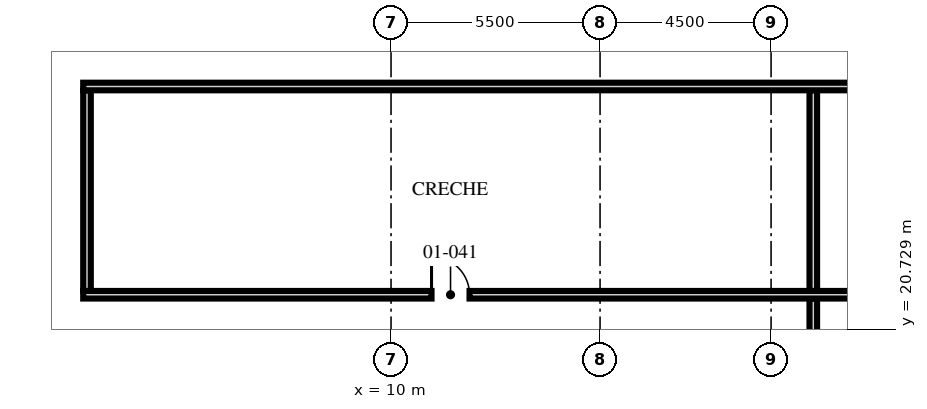
"""IFC4 building model, lengths in metres.
Left out: names, types, materials, properties, quantities, classifications, styles, units other than length and angle.
Written with IfcOpenShell. Run it as: python <this file> out.ifc"""

import sys

from ifc_helpers import new_model, si_unit, direction, frame, frame_2d, origin, place, context, subcontext, project, spatial, rectangle, extrude, element, fill, save


model = new_model("IFC4")
c1 = context("Model", 3, precision=1e-05, world=origin(), true_north=direction((0.0, 1.0)))
c2 = subcontext(c1, "Body", "Model", "MODEL_VIEW")
j1 = project(units=[si_unit("LENGTHUNIT", "METRE"), si_unit("PLANEANGLEUNIT", "RADIAN")], contexts=[c1])
p1 = place(None, origin())
s1 = spatial("IfcSite", under=j1, at=p1, CompositionType="ELEMENT")
p2 = place(p1, origin())
s2 = spatial("IfcBuilding", under=s1, at=p2, CompositionType="ELEMENT")
p3 = place(p2, frame((0.0, 0.0, 6.0)))
s3 = spatial("IfcBuildingStorey", under=s2, at=p3, CompositionType="ELEMENT", Elevation=6.0)
p4 = place(p3, frame((21.111, -20.491, 0.0), z_axis=(0.0, 0.0, 1.0), x_axis=(0.0, 1.0, 0.0)))
e1 = element("IfcWall", 1, at=p4, inside=s3, PredefinedType="SOLIDWALL", context=c2, shape_type="SweptSolid", body=[
    extrude(rectangle(XDim=42.022, YDim=0.2, at=frame_2d((21.011, 0.0))), origin(), (0.0, 0.0, 1.0), 3.5),
])
p5 = place(p4, frame((3.623, 0.0, 0.0)))
e2 = element("IfcOpeningElement", 2, at=p5, cuts=e1, PredefinedType="OPENING", context=c2, shape_type="SweptSolid", body=[
    extrude(rectangle(XDim=1.0, YDim=2.1, at=frame_2d((0.5, 1.05))), frame((0.0, 0.11, 0.0), z_axis=(0.0, -1.0, 0.0), x_axis=(1.0, 0.0, 0.0)), (0.0, 0.0, 1.0), 0.22),
])
p6 = place(p4, frame((13.14, 0.0, 0.0)))
e3 = element("IfcOpeningElement", 3, at=p6, cuts=e1, PredefinedType="OPENING", context=c2, shape_type="SweptSolid", body=[
    extrude(rectangle(XDim=1.0, YDim=2.1, at=frame_2d((0.5, 1.05))), frame((0.0, 0.11, 0.0), z_axis=(0.0, -1.0, 0.0), x_axis=(1.0, 0.0, 0.0)), (0.0, 0.0, 1.0), 0.22),
])
p7 = place(p4, frame((21.769, 0.0, 0.0)))
e4 = element("IfcOpeningElement", 4, at=p7, cuts=e1, PredefinedType="OPENING", context=c2, shape_type="SweptSolid", body=[
    extrude(rectangle(XDim=1.0, YDim=2.1, at=frame_2d((0.5, 1.05))), frame((0.0, 0.11, 0.0), z_axis=(0.0, -1.0, 0.0), x_axis=(1.0, 0.0, 0.0)), (0.0, 0.0, 1.0), 0.22),
])
p8 = place(p4, frame((31.47, 0.0, 0.0)))
e5 = element("IfcOpeningElement", 5, at=p8, cuts=e1, PredefinedType="OPENING", context=c2, shape_type="SweptSolid", body=[
    extrude(rectangle(XDim=1.0, YDim=2.1, at=frame_2d((0.5, 1.05))), frame((0.0, 0.11, 0.0), z_axis=(0.0, -1.0, 0.0), x_axis=(1.0, 0.0, 0.0)), (0.0, 0.0, 1.0), 0.22),
])
p9 = place(p4, frame((38.657, 0.0, 0.0)))
e6 = element("IfcOpeningElement", 6, at=p9, cuts=e1, PredefinedType="OPENING", context=c2, shape_type="SweptSolid", body=[
    extrude(rectangle(XDim=1.0, YDim=2.1, at=frame_2d((0.5, 1.05))), frame((0.0, 0.11, 0.0), z_axis=(0.0, -1.0, 0.0), x_axis=(1.0, 0.0, 0.0)), (0.0, 0.0, 1.0), 0.22),
])
p10 = place(p4, frame((8.918, 0.0, 0.0)))
e7 = element("IfcOpeningElement", 7, at=p10, cuts=e1, PredefinedType="OPENING", context=c2, shape_type="SweptSolid", body=[
    extrude(rectangle(XDim=1.0, YDim=2.1, at=frame_2d((0.5, 1.05))), frame((0.0, 0.11, 0.0), z_axis=(0.0, -1.0, 0.0), x_axis=(1.0, 0.0, 0.0)), (0.0, 0.0, 1.0), 0.22),
])
p11 = place(p3, frame((1.9, 21.631, 0.0), z_axis=(0.0, 0.0, 1.0), x_axis=(1.0, 0.0, 0.0)))
e8 = element("IfcWall", 8, at=p11, inside=s3, PredefinedType="SOLIDWALL", context=c2, shape_type="SweptSolid", body=[
    extrude(rectangle(XDim=26.95, YDim=0.2, at=frame_2d((13.475, 0.0))), origin(), (0.0, 0.0, 1.0), 3.5),
])
p12 = place(p11, frame((9.166, 0.0, 0.0)))
e9 = element("IfcOpeningElement", 9, at=p12, cuts=e8, PredefinedType="OPENING", context=c2, shape_type="SweptSolid", body=[
    extrude(rectangle(XDim=1.0, YDim=2.1, at=frame_2d((0.5, 1.05))), frame((0.0, 0.11, 0.0), z_axis=(0.0, -1.0, 0.0), x_axis=(1.0, 0.0, 0.0)), (0.0, 0.0, 1.0), 0.22),
])
for number, where, z_axis, x_axis in (
    (10, (2.0, 21.731, 0.0), (0.0, 0.0, 1.0), (0.0, 1.0, 0.0)),
    (11, (21.111, 21.731, 0.0), (0.0, 0.0, 1.0), (0.0, 1.0, 0.0)),
):
    element("IfcWall", number, at=place(p3, frame(where, z_axis=z_axis, x_axis=x_axis)), inside=s3, PredefinedType="SOLIDWALL", context=c2, shape_type="SweptSolid", body=[
        extrude(rectangle(XDim=5.28, YDim=0.2, at=frame_2d((2.64, 0.0))), origin(), (0.0, 0.0, 1.0), 4.7),
    ])
p13 = place(p3, frame((1.9, 27.111, 0.0), z_axis=(0.0, 0.0, 1.0), x_axis=(1.0, 0.0, 0.0)))
e12 = element("IfcWall", 12, at=p13, inside=s3, PredefinedType="SOLIDWALL", context=c2, shape_type="SweptSolid", body=[
    extrude(rectangle(XDim=36.175, YDim=0.2, at=frame_2d((18.087, 0.0))), origin(), (0.0, 0.0, 1.0), 3.5),
])
p14 = place(p13, frame((29.695, 0.0, 0.0)))
e13 = element("IfcOpeningElement", 13, at=p14, cuts=e12, PredefinedType="OPENING", context=c2, shape_type="SweptSolid", body=[
    extrude(rectangle(XDim=1.0, YDim=2.1, at=frame_2d((0.5, 1.05))), frame((0.0, 0.11, 0.0), z_axis=(0.0, -1.0, 0.0), x_axis=(1.0, 0.0, 0.0)), (0.0, 0.0, 1.0), 0.22),
])
p15 = place(p12, origin())
e14 = element("IfcDoor", 14, at=p15, inside=s3, OperationType="SINGLE_SWING_LEFT", PredefinedType="DOOR", context=c2, shape_type="SweptSolid", body=[
    extrude(rectangle(XDim=1.0, YDim=2.1, at=frame_2d((0.5, 1.05))), frame((0.0, 0.025, 0.0), z_axis=(0.0, -1.0, 0.0), x_axis=(1.0, 0.0, 0.0)), (0.0, 0.0, 1.0), 0.05),
])
fill(e9, e14)
save(model, sys.argv[1])
